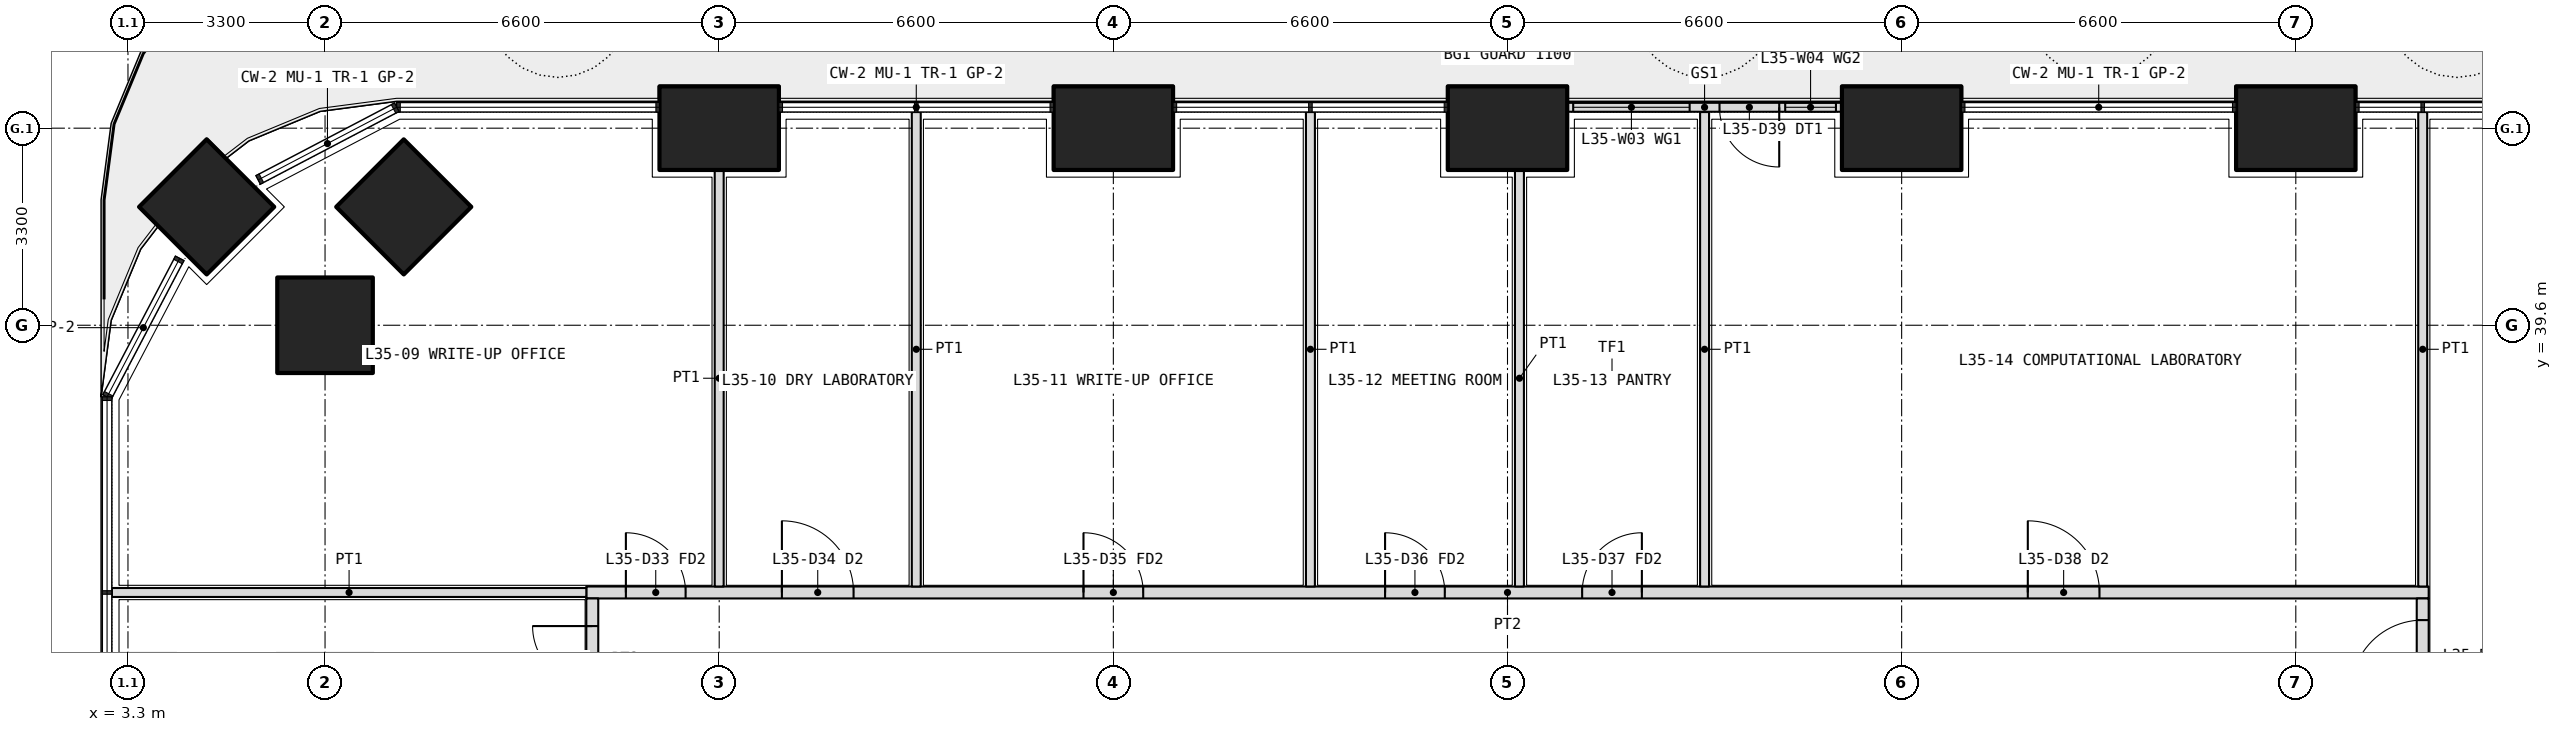
"""IFC4 building model, lengths in metres.
Left out: names, types, materials, properties, quantities, classifications, styles, units other than length and angle.
Written with IfcOpenShell. Run it as: python <this file> out.ifc"""

import sys

from ifc_helpers import new_model, si_unit, direction, frame, frame_2d, origin, origin_2d, place, context, subcontext, project, spatial, rectangle, extrude, element, fill, save


model = new_model("IFC4")
c1 = context("Model", 3, precision=1e-05, world=origin(), true_north=direction((0.0, 1.0)))
c2 = subcontext(c1, "Body", "Model", "MODEL_VIEW")
j1 = project(units=[si_unit("LENGTHUNIT", "METRE"), si_unit("PLANEANGLEUNIT", "RADIAN")], contexts=[c1])
p1 = place(None, origin())
s1 = spatial("IfcSite", under=j1, at=p1, CompositionType="ELEMENT")
p2 = place(p1, origin())
s2 = spatial("IfcBuilding", under=s1, at=p2, CompositionType="ELEMENT")
p3 = place(p2, frame((0.0, 0.0, 155.7)))
s3 = spatial("IfcBuildingStorey", under=s2, at=p3, CompositionType="ELEMENT", Elevation=155.7)
p4 = place(p3, frame((4.618, 41.582, 0.0), z_axis=(0.0, 0.0, 1.0), x_axis=(0.707106781187, 0.707106781187, 0.0)))
e1 = element("IfcColumn", 1, at=p4, inside=s3, PredefinedType="COLUMN", context=c2, shape_type="SweptSolid", body=[
    extrude(rectangle(XDim=1.6, YDim=1.6, at=origin_2d()), origin(), (0.0, 0.0, 1.0), 4.2),
])
for number, where, z_axis, x_axis in (
    (2, (13.2, 42.9, 0.0), (0.0, 0.0, 1.0), (1.0, 0.0, 0.0)),
    (3, (19.8, 42.9, 0.0), (0.0, 0.0, 1.0), (1.0, 0.0, 0.0)),
    (4, (26.4, 42.9, 0.0), (0.0, 0.0, 1.0), (1.0, 0.0, 0.0)),
    (5, (33.0, 42.9, 0.0), (0.0, 0.0, 1.0), (1.0, 0.0, 0.0)),
    (6, (39.6, 42.9, 0.0), (0.0, 0.0, 1.0), (1.0, 0.0, 0.0)),
):
    element("IfcColumn", number, at=place(p3, frame(where, z_axis=z_axis, x_axis=x_axis)), inside=s3, PredefinedType="COLUMN", context=c2, shape_type="SweptSolid", body=[
        extrude(rectangle(XDim=2.0, YDim=1.4, at=origin_2d()), origin(), (0.0, 0.0, 1.0), 4.2),
    ])
for number, where, z_axis, x_axis in (
    (7, (6.6, 39.6, 0.0), (0.0, 0.0, 1.0), (1.0, 0.0, 0.0)),
    (8, (7.918, 41.582, 0.0), (0.0, 0.0, 1.0), (0.707, 0.707, 0.0)),
):
    element("IfcColumn", number, at=place(p3, frame(where, z_axis=z_axis, x_axis=x_axis)), inside=s3, PredefinedType="COLUMN", context=c2, shape_type="SweptSolid", body=[
        extrude(rectangle(XDim=1.6, YDim=1.6, at=origin_2d()), origin(), (0.0, 0.0, 1.0), 4.2),
    ])
p5 = place(p3, frame((32.0, 43.25, 0.0), z_axis=(0.0, 0.0, 1.0), x_axis=(-1.0, 0.0, 0.0)))
e9 = element("IfcWall", 9, at=p5, inside=s3, PredefinedType="SOLIDWALL", context=c2, shape_type="SweptSolid", body=[
    extrude(rectangle(XDim=4.6, YDim=0.15, at=frame_2d((2.3, 0.0))), origin(), (0.0, 0.0, 1.0), 2.7),
])
p6 = place(p5, frame((1.05, 0.0, 0.0)))
e10 = element("IfcOpeningElement", 10, at=p6, cuts=e9, PredefinedType="OPENING", context=c2, shape_type="SweptSolid", body=[
    extrude(rectangle(XDim=1.0, YDim=2.4, at=frame_2d((0.5, 1.2))), frame((0.0, 0.085, 0.0), z_axis=(0.0, -1.0, 0.0), x_axis=(1.0, 0.0, 0.0)), (0.0, 0.0, 1.0), 0.17),
])
p7 = place(p5, frame((0.1, 0.0, 0.1)))
e11 = element("IfcOpeningElement", 11, at=p7, cuts=e9, PredefinedType="OPENING", context=c2, shape_type="SweptSolid", body=[
    extrude(rectangle(XDim=0.85, YDim=2.3, at=frame_2d((0.425, 1.15))), frame((0.0, 0.085, 0.0), z_axis=(0.0, -1.0, 0.0), x_axis=(1.0, 0.0, 0.0)), (0.0, 0.0, 1.0), 0.17),
])
p8 = place(p5, frame((2.55, 0.0, 0.1)))
e12 = element("IfcOpeningElement", 12, at=p8, cuts=e9, PredefinedType="OPENING", context=c2, shape_type="SweptSolid", body=[
    extrude(rectangle(XDim=1.95, YDim=2.3, at=frame_2d((0.975, 1.15))), frame((0.0, 0.085, 0.0), z_axis=(0.0, -1.0, 0.0), x_axis=(1.0, 0.0, 0.0)), (0.0, 0.0, 1.0), 0.17),
])
p9 = place(p3, frame((10.975, 35.125, 0.0), z_axis=(0.0, 0.0, 1.0), x_axis=(1.0, 0.0, 0.0)))
e13 = element("IfcWall", 13, at=p9, inside=s3, PredefinedType="PARTITIONING", context=c2, shape_type="SweptSolid", body=[
    extrude(rectangle(XDim=30.85, YDim=0.2, at=frame_2d((15.425, 0.0))), origin(), (0.0, 0.0, 1.0), 2.85),
])
p10 = place(p9, frame((0.663, 0.0, 0.0)))
e14 = element("IfcOpeningElement", 14, at=p10, cuts=e13, PredefinedType="OPENING", context=c2, shape_type="SweptSolid", body=[
    extrude(rectangle(XDim=1.0, YDim=2.1, at=frame_2d((0.5, 1.05))), frame((0.0, 0.11, 0.0), z_axis=(0.0, -1.0, 0.0), x_axis=(1.0, 0.0, 0.0)), (0.0, 0.0, 1.0), 0.22),
])
p11 = place(p9, frame((3.275, 0.0, 0.0)))
e15 = element("IfcOpeningElement", 15, at=p11, cuts=e13, PredefinedType="OPENING", context=c2, shape_type="SweptSolid", body=[
    extrude(rectangle(XDim=1.2, YDim=2.1, at=frame_2d((0.6, 1.05))), frame((0.0, 0.11, 0.0), z_axis=(0.0, -1.0, 0.0), x_axis=(1.0, 0.0, 0.0)), (0.0, 0.0, 1.0), 0.22),
])
p12 = place(p9, frame((8.325, 0.0, 0.0)))
e16 = element("IfcOpeningElement", 16, at=p12, cuts=e13, PredefinedType="OPENING", context=c2, shape_type="SweptSolid", body=[
    extrude(rectangle(XDim=1.0, YDim=2.1, at=frame_2d((0.5, 1.05))), frame((0.0, 0.11, 0.0), z_axis=(0.0, -1.0, 0.0), x_axis=(1.0, 0.0, 0.0)), (0.0, 0.0, 1.0), 0.22),
])
p13 = place(p9, frame((13.375, 0.0, 0.0)))
e17 = element("IfcOpeningElement", 17, at=p13, cuts=e13, PredefinedType="OPENING", context=c2, shape_type="SweptSolid", body=[
    extrude(rectangle(XDim=1.0, YDim=2.1, at=frame_2d((0.5, 1.05))), frame((0.0, 0.11, 0.0), z_axis=(0.0, -1.0, 0.0), x_axis=(1.0, 0.0, 0.0)), (0.0, 0.0, 1.0), 0.22),
])
p14 = place(p9, frame((16.675, 0.0, 0.0)))
e18 = element("IfcOpeningElement", 18, at=p14, cuts=e13, PredefinedType="OPENING", context=c2, shape_type="SweptSolid", body=[
    extrude(rectangle(XDim=1.0, YDim=2.1, at=frame_2d((0.5, 1.05))), frame((0.0, 0.11, 0.0), z_axis=(0.0, -1.0, 0.0), x_axis=(1.0, 0.0, 0.0)), (0.0, 0.0, 1.0), 0.22),
])
p15 = place(p9, frame((24.137, 0.0, 0.0)))
e19 = element("IfcOpeningElement", 19, at=p15, cuts=e13, PredefinedType="OPENING", context=c2, shape_type="SweptSolid", body=[
    extrude(rectangle(XDim=1.2, YDim=2.1, at=frame_2d((0.6, 1.05))), frame((0.0, 0.11, 0.0), z_axis=(0.0, -1.0, 0.0), x_axis=(1.0, 0.0, 0.0)), (0.0, 0.0, 1.0), 0.22),
])
p16 = place(p3, frame((11.075, 33.0, 0.0), z_axis=(0.0, 0.0, 1.0), x_axis=(0.0, 1.0, 0.0)))
e20 = element("IfcWall", 20, at=p16, inside=s3, PredefinedType="PARTITIONING", context=c2, shape_type="SweptSolid", body=[
    extrude(rectangle(XDim=2.025, YDim=0.2, at=frame_2d((1.012, 0.0))), origin(), (0.0, 0.0, 1.0), 2.85),
])
p17 = place(p16, frame((0.562, 0.0, 0.0)))
e21 = element("IfcOpeningElement", 21, at=p17, cuts=e20, PredefinedType="OPENING", context=c2, shape_type="SweptSolid", body=[
    extrude(rectangle(XDim=1.0, YDim=2.1, at=frame_2d((0.5, 1.05))), frame((0.0, 0.11, 0.0), z_axis=(0.0, -1.0, 0.0), x_axis=(1.0, 0.0, 0.0)), (0.0, 0.0, 1.0), 0.22),
])
p18 = place(p3, frame((41.725, 11.175, 0.0), z_axis=(0.0, 0.0, 1.0), x_axis=(0.0, 1.0, 0.0)))
e22 = element("IfcWall", 22, at=p18, inside=s3, PredefinedType="PARTITIONING", context=c2, shape_type="SweptSolid", body=[
    extrude(rectangle(XDim=23.85, YDim=0.2, at=frame_2d((11.925, 0.0))), origin(), (0.0, 0.0, 1.0), 2.85),
])
p19 = place(p18, frame((3.663, 0.0, 0.0)))
e23 = element("IfcOpeningElement", 23, at=p19, cuts=e22, PredefinedType="OPENING", context=c2, shape_type="SweptSolid", body=[
    extrude(rectangle(XDim=1.2, YDim=2.1, at=frame_2d((0.6, 1.05))), frame((0.0, 0.11, 0.0), z_axis=(0.0, -1.0, 0.0), x_axis=(1.0, 0.0, 0.0)), (0.0, 0.0, 1.0), 0.22),
])
p20 = place(p18, frame((9.625, 0.0, 0.0)))
e24 = element("IfcOpeningElement", 24, at=p20, cuts=e22, PredefinedType="OPENING", context=c2, shape_type="SweptSolid", body=[
    extrude(rectangle(XDim=1.0, YDim=2.1, at=frame_2d((0.5, 1.05))), frame((0.0, 0.11, 0.0), z_axis=(0.0, -1.0, 0.0), x_axis=(1.0, 0.0, 0.0)), (0.0, 0.0, 1.0), 0.22),
])
p21 = place(p18, frame((12.975, 0.0, 0.0)))
e25 = element("IfcOpeningElement", 25, at=p21, cuts=e22, PredefinedType="OPENING", context=c2, shape_type="SweptSolid", body=[
    extrude(rectangle(XDim=0.9, YDim=2.1, at=frame_2d((0.45, 1.05))), frame((0.0, 0.11, 0.0), z_axis=(0.0, -1.0, 0.0), x_axis=(1.0, 0.0, 0.0)), (0.0, 0.0, 1.0), 0.22),
])
p22 = place(p18, frame((16.375, 0.0, 0.0)))
e26 = element("IfcOpeningElement", 26, at=p22, cuts=e22, PredefinedType="OPENING", context=c2, shape_type="SweptSolid", body=[
    extrude(rectangle(XDim=1.0, YDim=2.1, at=frame_2d((0.5, 1.05))), frame((0.0, 0.11, 0.0), z_axis=(0.0, -1.0, 0.0), x_axis=(1.0, 0.0, 0.0)), (0.0, 0.0, 1.0), 0.22),
])
p23 = place(p18, frame((19.675, 0.0, 0.0)))
e27 = element("IfcOpeningElement", 27, at=p23, cuts=e22, PredefinedType="OPENING", context=c2, shape_type="SweptSolid", body=[
    extrude(rectangle(XDim=1.0, YDim=2.1, at=frame_2d((0.5, 1.05))), frame((0.0, 0.11, 0.0), z_axis=(0.0, -1.0, 0.0), x_axis=(1.0, 0.0, 0.0)), (0.0, 0.0, 1.0), 0.22),
])
p24 = place(p18, frame((22.288, 0.0, 0.0)))
e28 = element("IfcOpeningElement", 28, at=p24, cuts=e22, PredefinedType="OPENING", context=c2, shape_type="SweptSolid", body=[
    extrude(rectangle(XDim=1.2, YDim=2.1, at=frame_2d((0.6, 1.05))), frame((0.0, 0.11, 0.0), z_axis=(0.0, -1.0, 0.0), x_axis=(1.0, 0.0, 0.0)), (0.0, 0.0, 1.0), 0.22),
])
p25 = place(p3, frame((41.725, 43.17, 0.0), z_axis=(0.0, 0.0, 1.0), x_axis=(0.0, -1.0, 0.0)))
e29 = element("IfcWall", 29, at=p25, inside=s3, PredefinedType="PARTITIONING", context=c2, shape_type="SweptSolid", body=[
    extrude(rectangle(XDim=7.945, YDim=0.15, at=frame_2d((3.972, 0.0))), origin(), (0.0, 0.0, 1.0), 2.7),
])
p26 = place(p3, frame((3.03, 35.125, 0.0), z_axis=(0.0, 0.0, 1.0), x_axis=(1.0, 0.0, 0.0)))
e30 = element("IfcWall", 30, at=p26, inside=s3, PredefinedType="PARTITIONING", context=c2, shape_type="SweptSolid", body=[
    extrude(rectangle(XDim=7.945, YDim=0.15, at=frame_2d((3.973, 0.0))), origin(), (0.0, 0.0, 1.0), 2.7),
])
for number, where, z_axis, x_axis in (
    (31, (26.6, 42.2, 0.0), (0.0, 0.0, 1.0), (0.0, -1.0, 0.0)),
    (32, (13.2, 42.2, 0.0), (0.0, 0.0, 1.0), (0.0, -1.0, 0.0)),
):
    element("IfcWall", number, at=place(p3, frame(where, z_axis=z_axis, x_axis=x_axis)), inside=s3, PredefinedType="PARTITIONING", context=c2, shape_type="SweptSolid", body=[
        extrude(rectangle(XDim=6.975, YDim=0.15, at=frame_2d((3.487, 0.0))), origin(), (0.0, 0.0, 1.0), 2.85),
    ])
for number, where, z_axis, x_axis in (
    (33, (16.5, 43.17, 0.0), (0.0, 0.0, 1.0), (0.0, -1.0, 0.0)),
    (34, (23.1, 43.17, 0.0), (0.0, 0.0, 1.0), (0.0, -1.0, 0.0)),
    (35, (29.7, 43.17, 0.0), (0.0, 0.0, 1.0), (0.0, -1.0, 0.0)),
):
    element("IfcWall", number, at=place(p3, frame(where, z_axis=z_axis, x_axis=x_axis)), inside=s3, PredefinedType="PARTITIONING", context=c2, shape_type="SweptSolid", body=[
        extrude(rectangle(XDim=7.945, YDim=0.15, at=frame_2d((3.972, 0.0))), origin(), (0.0, 0.0, 1.0), 2.7),
    ])
p27 = place(p6, origin())
e36 = element("IfcDoor", 36, at=p27, inside=s3, OperationType="SINGLE_SWING_LEFT", PredefinedType="DOOR", context=c2, shape_type="SweptSolid", body=[
    extrude(rectangle(XDim=1.0, YDim=2.4, at=frame_2d((0.5, 1.2))), frame((0.0, 0.025, 0.0), z_axis=(0.0, -1.0, 0.0), x_axis=(1.0, 0.0, 0.0)), (0.0, 0.0, 1.0), 0.05),
])
fill(e10, e36)
p28 = place(p7, origin())
e37 = element("IfcWindow", 37, at=p28, inside=s3, PartitioningType="SINGLE_PANEL", PredefinedType="WINDOW", context=c2, shape_type="SweptSolid", body=[
    extrude(rectangle(XDim=0.85, YDim=2.3, at=frame_2d((0.425, 1.15))), frame((0.0, 0.03, 0.0), z_axis=(0.0, -1.0, 0.0), x_axis=(1.0, 0.0, 0.0)), (0.0, 0.0, 1.0), 0.06),
])
fill(e11, e37)
p29 = place(p8, origin())
e38 = element("IfcWindow", 38, at=p29, inside=s3, PartitioningType="SINGLE_PANEL", PredefinedType="WINDOW", context=c2, shape_type="SweptSolid", body=[
    extrude(rectangle(XDim=1.95, YDim=2.3, at=frame_2d((0.975, 1.15))), frame((0.0, 0.03, 0.0), z_axis=(0.0, -1.0, 0.0), x_axis=(1.0, 0.0, 0.0)), (0.0, 0.0, 1.0), 0.06),
])
fill(e12, e38)
p30 = place(p24, origin())
e39 = element("IfcDoor", 39, at=p30, inside=s3, OperationType="DOUBLE_DOOR_SINGLE_SWING", PredefinedType="DOOR", context=c2, shape_type="SweptSolid", body=[
    extrude(rectangle(XDim=1.2, YDim=2.1, at=frame_2d((0.6, 1.05))), frame((0.0, 0.025, 0.0), z_axis=(0.0, -1.0, 0.0), x_axis=(1.0, 0.0, 0.0)), (0.0, 0.0, 1.0), 0.05),
])
fill(e28, e39)
p31 = place(p10, origin())
e40 = element("IfcDoor", 40, at=p31, inside=s3, OperationType="SINGLE_SWING_LEFT", PredefinedType="DOOR", context=c2, shape_type="SweptSolid", body=[
    extrude(rectangle(XDim=1.0, YDim=2.1, at=frame_2d((0.5, 1.05))), frame((0.0, 0.025, 0.0), z_axis=(0.0, -1.0, 0.0), x_axis=(1.0, 0.0, 0.0)), (0.0, 0.0, 1.0), 0.05),
])
fill(e14, e40)
p32 = place(p11, origin())
e41 = element("IfcDoor", 41, at=p32, inside=s3, OperationType="DOUBLE_DOOR_SINGLE_SWING", PredefinedType="DOOR", context=c2, shape_type="SweptSolid", body=[
    extrude(rectangle(XDim=1.2, YDim=2.1, at=frame_2d((0.6, 1.05))), frame((0.0, 0.025, 0.0), z_axis=(0.0, -1.0, 0.0), x_axis=(1.0, 0.0, 0.0)), (0.0, 0.0, 1.0), 0.05),
])
fill(e15, e41)
p33 = place(p12, origin())
e42 = element("IfcDoor", 42, at=p33, inside=s3, OperationType="SINGLE_SWING_LEFT", PredefinedType="DOOR", context=c2, shape_type="SweptSolid", body=[
    extrude(rectangle(XDim=1.0, YDim=2.1, at=frame_2d((0.5, 1.05))), frame((0.0, 0.025, 0.0), z_axis=(0.0, -1.0, 0.0), x_axis=(1.0, 0.0, 0.0)), (0.0, 0.0, 1.0), 0.05),
])
fill(e16, e42)
p34 = place(p13, origin())
e43 = element("IfcDoor", 43, at=p34, inside=s3, OperationType="SINGLE_SWING_LEFT", PredefinedType="DOOR", context=c2, shape_type="SweptSolid", body=[
    extrude(rectangle(XDim=1.0, YDim=2.1, at=frame_2d((0.5, 1.05))), frame((0.0, 0.025, 0.0), z_axis=(0.0, -1.0, 0.0), x_axis=(1.0, 0.0, 0.0)), (0.0, 0.0, 1.0), 0.05),
])
fill(e17, e43)
p35 = place(p14, origin())
e44 = element("IfcDoor", 44, at=p35, inside=s3, OperationType="SINGLE_SWING_RIGHT", PredefinedType="DOOR", context=c2, shape_type="SweptSolid", body=[
    extrude(rectangle(XDim=1.0, YDim=2.1, at=frame_2d((0.5, 1.05))), frame((0.0, 0.025, 0.0), z_axis=(0.0, -1.0, 0.0), x_axis=(1.0, 0.0, 0.0)), (0.0, 0.0, 1.0), 0.05),
])
fill(e18, e44)
p36 = place(p15, origin())
e45 = element("IfcDoor", 45, at=p36, inside=s3, OperationType="DOUBLE_DOOR_SINGLE_SWING", PredefinedType="DOOR", context=c2, shape_type="SweptSolid", body=[
    extrude(rectangle(XDim=1.2, YDim=2.1, at=frame_2d((0.6, 1.05))), frame((0.0, 0.025, 0.0), z_axis=(0.0, -1.0, 0.0), x_axis=(1.0, 0.0, 0.0)), (0.0, 0.0, 1.0), 0.05),
])
fill(e19, e45)
p37 = place(p17, origin())
e46 = element("IfcDoor", 46, at=p37, inside=s3, OperationType="SINGLE_SWING_RIGHT", PredefinedType="DOOR", context=c2, shape_type="SweptSolid", body=[
    extrude(rectangle(XDim=1.0, YDim=2.1, at=frame_2d((0.5, 1.05))), frame((0.0, 0.025, 0.0), z_axis=(0.0, -1.0, 0.0), x_axis=(1.0, 0.0, 0.0)), (0.0, 0.0, 1.0), 0.05),
])
fill(e21, e46)
save(model, sys.argv[1])
